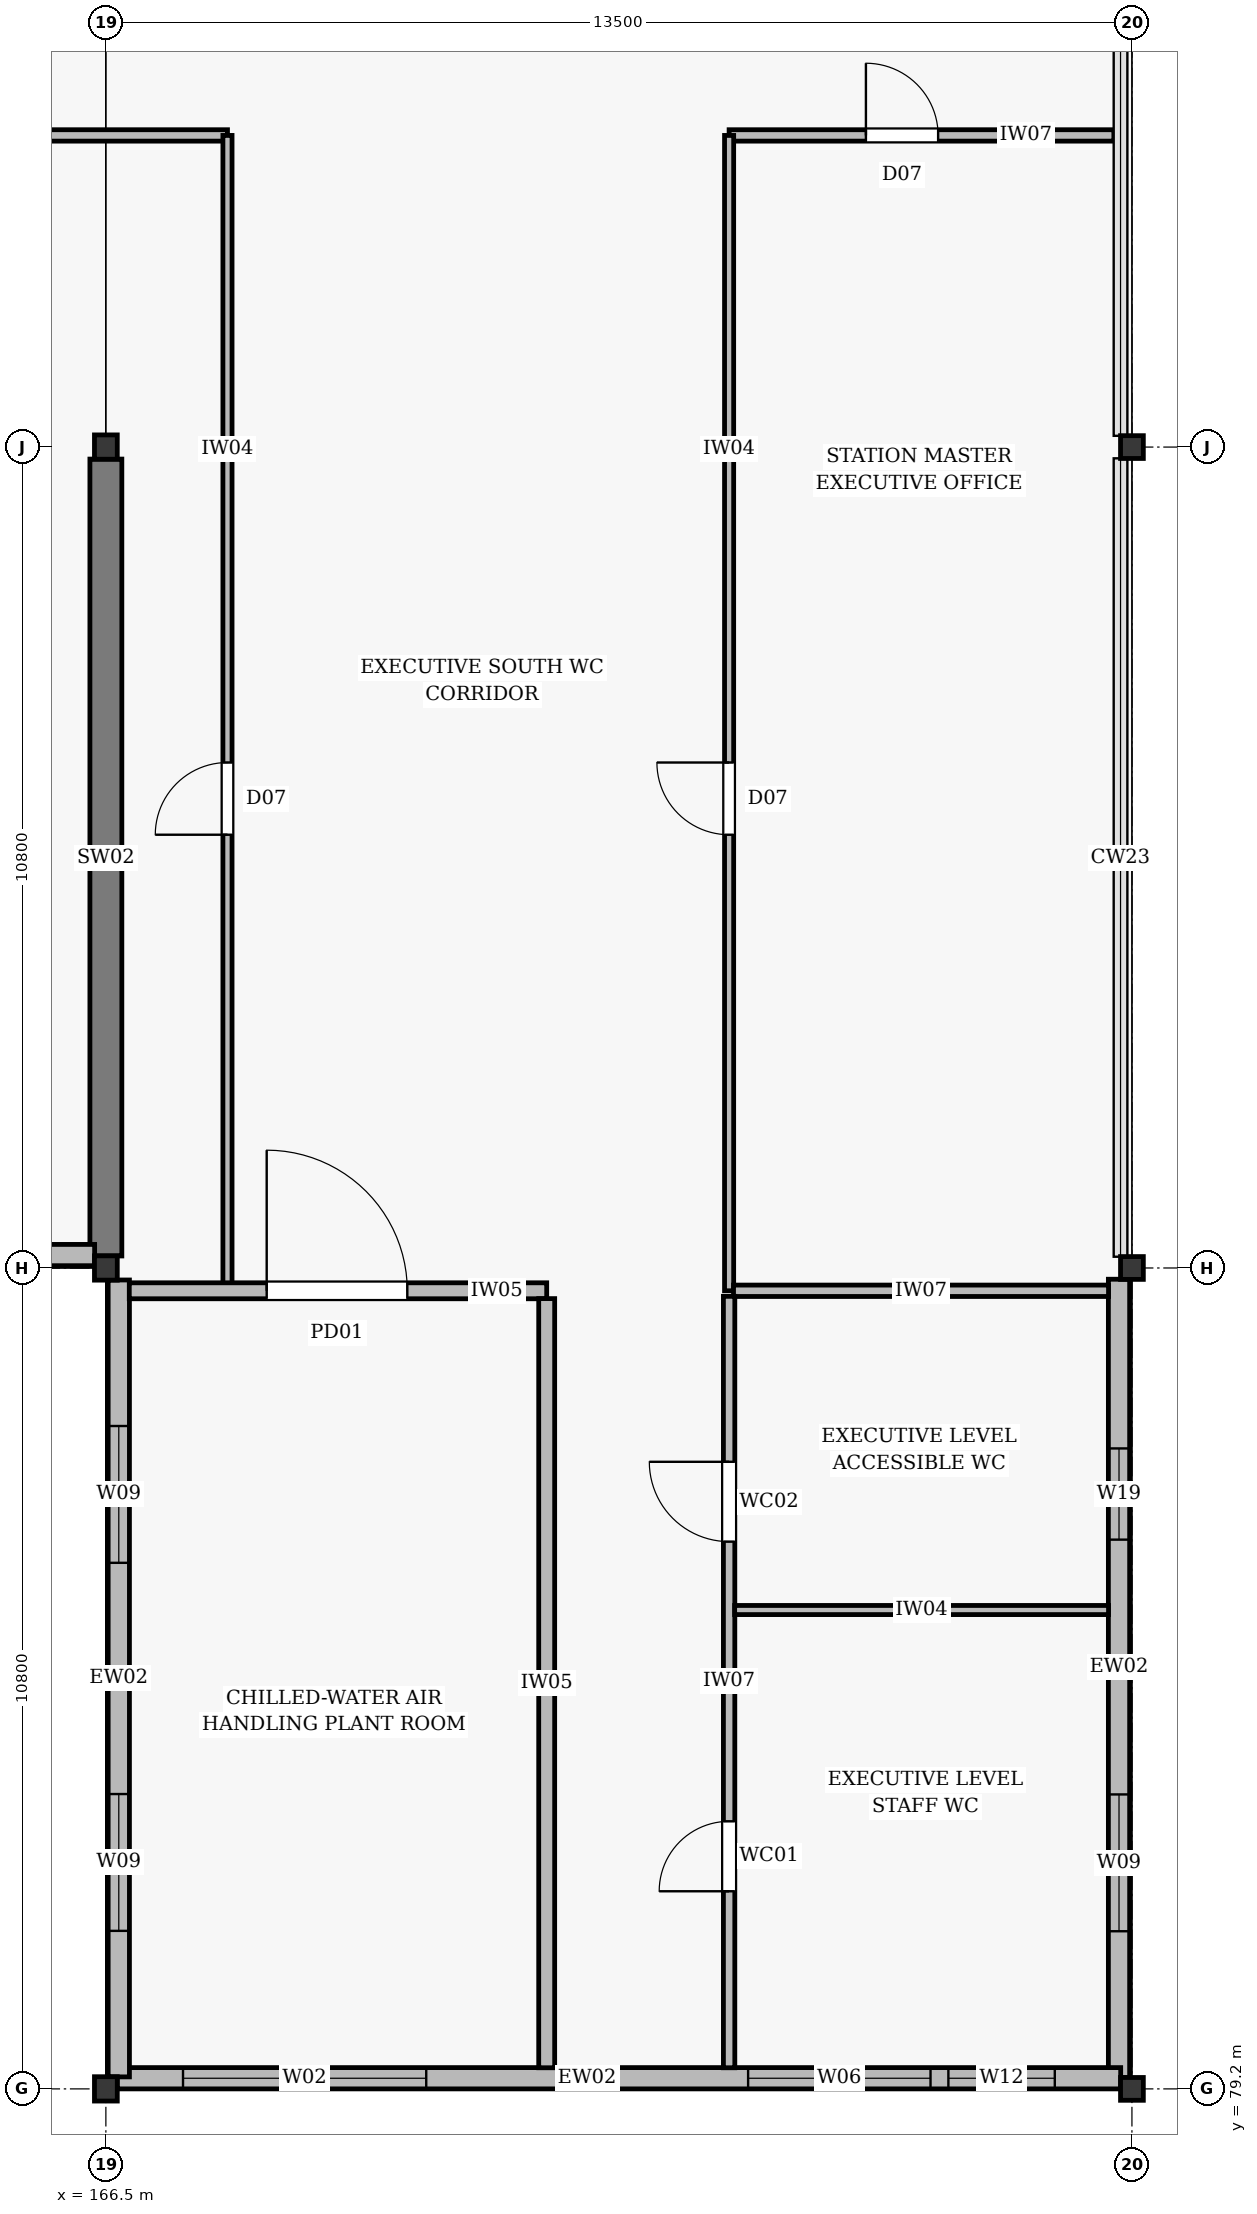
"""IFC4 building model, lengths in metres.
Left out: names, types, materials, properties, quantities, classifications, styles, units other than length and angle.
Written with IfcOpenShell. Run it as: python <this file> out.ifc"""

import sys

from ifc_helpers import new_model, si_unit, direction, frame, frame_2d, origin, origin_2d, place, context, subcontext, project, spatial, rectangle, i_section, extrude, element, fill, save


model = new_model("IFC4")
c1 = context("Model", 3, precision=1e-05, world=origin(), true_north=direction((0.0, 1.0)))
c2 = subcontext(c1, "Body", "Model", "MODEL_VIEW")
j1 = project(units=[si_unit("LENGTHUNIT", "METRE"), si_unit("PLANEANGLEUNIT", "RADIAN")], contexts=[c1])
p1 = place(None, origin())
s1 = spatial("IfcSite", under=j1, at=p1, CompositionType="ELEMENT")
p2 = place(p1, origin())
s2 = spatial("IfcBuilding", under=s1, at=p2, CompositionType="ELEMENT")
p3 = place(p2, frame((0.0, 0.0, 25.2)))
s3 = spatial("IfcBuildingStorey", under=s2, at=p3, CompositionType="ELEMENT", Elevation=25.2)
for number, where, z_axis, x_axis in (
    (1, (166.5, 79.2, 0.0), (0.0, 0.0, 1.0), (1.0, 0.0, 0.0)),
    (2, (166.5, 90.0, 0.0), (0.0, 0.0, 1.0), (1.0, 0.0, 0.0)),
    (3, (166.5, 100.8, 0.0), (0.0, 0.0, 1.0), (1.0, 0.0, 0.0)),
):
    element("IfcColumn", number, at=place(p3, frame(where, z_axis=z_axis, x_axis=x_axis)), inside=s3, PredefinedType="COLUMN", context=c2, shape_type="SweptSolid", body=[
        extrude(i_section(OverallWidth=0.3, OverallDepth=0.32, WebThickness=0.011, FlangeThickness=0.021, at=origin_2d()), origin(), (0.0, 0.0, 1.0), 5.4),
    ])
for number, where, z_axis, x_axis in (
    (4, (180.0, 79.2, 0.0), (0.0, 0.0, 1.0), (1.0, 0.0, 0.0)),
    (5, (180.0, 90.0, 0.0), (0.0, 0.0, 1.0), (1.0, 0.0, 0.0)),
    (6, (180.0, 100.8, 0.0), (0.0, 0.0, 1.0), (1.0, 0.0, 0.0)),
):
    element("IfcColumn", number, at=place(p3, frame(where, z_axis=z_axis, x_axis=x_axis)), inside=s3, PredefinedType="COLUMN", context=c2, shape_type="SweptSolid", body=[
        extrude(i_section(OverallWidth=0.3, OverallDepth=0.3, WebThickness=0.011, FlangeThickness=0.019, at=origin_2d()), origin(), (0.0, 0.0, 1.0), 5.4),
    ])
p4 = place(p3, frame((166.5, 90.158, 0.0), z_axis=(0.0, 0.0, 1.0), x_axis=(0.0, 1.0, 0.0)))
e7 = element("IfcWall", 7, at=p4, inside=s3, PredefinedType="SHEAR", context=c2, shape_type="SweptSolid", body=[
    extrude(rectangle(XDim=10.484, YDim=0.42, at=frame_2d((5.242, 0.0))), origin(), (0.0, 0.0, 1.0), 5.24),
])
p5 = place(p3, frame((179.83, 79.348, 0.0), z_axis=(0.0, 0.0, 1.0), x_axis=(0.0, 1.0, 0.0)))
e8 = element("IfcWall", 8, at=p5, inside=s3, PredefinedType="STANDARD", context=c2, shape_type="SweptSolid", body=[
    extrude(rectangle(XDim=10.504, YDim=0.28, at=frame_2d((5.252, 0.0))), origin(), (0.0, 0.0, 1.0), 4.65),
])
p6 = place(p5, frame((1.926, 0.0, 0.75)))
e9 = element("IfcOpeningElement", 9, at=p6, cuts=e8, PredefinedType="OPENING", context=c2, shape_type="SweptSolid", body=[
    extrude(rectangle(XDim=1.8, YDim=2.2, at=frame_2d((0.9, 1.1))), frame((0.0, 0.152, 0.0), z_axis=(0.0, -1.0, 0.0), x_axis=(1.0, 0.0, 0.0)), (0.0, 0.0, 1.0), 0.304),
])
p7 = place(p5, frame((7.078, 0.0, 1.05)))
e10 = element("IfcOpeningElement", 10, at=p7, cuts=e8, PredefinedType="OPENING", context=c2, shape_type="SweptSolid", body=[
    extrude(rectangle(XDim=1.2, YDim=0.9, at=frame_2d((0.6, 0.45))), frame((0.0, 0.152, 0.0), z_axis=(0.0, -1.0, 0.0), x_axis=(1.0, 0.0, 0.0)), (0.0, 0.0, 1.0), 0.304),
])
p8 = place(p3, frame((166.648, 79.34, 0.0), z_axis=(0.0, 0.0, 1.0), x_axis=(1.0, 0.0, 0.0)))
e11 = element("IfcWall", 11, at=p8, inside=s3, PredefinedType="STANDARD", context=c2, shape_type="SweptSolid", body=[
    extrude(rectangle(XDim=13.204, YDim=0.28, at=frame_2d((6.602, 0.0))), origin(), (0.0, 0.0, 1.0), 4.65),
])
p9 = place(p8, frame((0.867, 0.0, 0.75)))
e12 = element("IfcOpeningElement", 12, at=p9, cuts=e11, PredefinedType="OPENING", context=c2, shape_type="SweptSolid", body=[
    extrude(rectangle(XDim=3.2, YDim=2.8, at=frame_2d((1.6, 1.4))), frame((0.0, 0.152, 0.0), z_axis=(0.0, -1.0, 0.0), x_axis=(1.0, 0.0, 0.0)), (0.0, 0.0, 1.0), 0.304),
])
p10 = place(p8, frame((8.302, 0.0, 0.75)))
e13 = element("IfcOpeningElement", 13, at=p10, cuts=e11, PredefinedType="OPENING", context=c2, shape_type="SweptSolid", body=[
    extrude(rectangle(XDim=2.4, YDim=2.4, at=frame_2d((1.2, 1.2))), frame((0.0, 0.152, 0.0), z_axis=(0.0, -1.0, 0.0), x_axis=(1.0, 0.0, 0.0)), (0.0, 0.0, 1.0), 0.304),
])
p11 = place(p8, frame((10.937, 0.0, 1.05)))
e14 = element("IfcOpeningElement", 14, at=p11, cuts=e11, PredefinedType="OPENING", context=c2, shape_type="SweptSolid", body=[
    extrude(rectangle(XDim=1.4, YDim=1.8, at=frame_2d((0.7, 0.9))), frame((0.0, 0.152, 0.0), z_axis=(0.0, -1.0, 0.0), x_axis=(1.0, 0.0, 0.0)), (0.0, 0.0, 1.0), 0.304),
])
p12 = place(p3, frame((153.148, 90.17, 0.0), z_axis=(0.0, 0.0, 1.0), x_axis=(1.0, 0.0, 0.0)))
e15 = element("IfcWall", 15, at=p12, inside=s3, PredefinedType="STANDARD", context=c2, shape_type="SweptSolid", body=[
    extrude(rectangle(XDim=13.204, YDim=0.28, at=frame_2d((6.602, 0.0))), origin(), (0.0, 0.0, 1.0), 4.65),
])
p13 = place(p12, frame((0.417, 0.0, 0.75)))
e16 = element("IfcOpeningElement", 16, at=p13, cuts=e15, PredefinedType="OPENING", context=c2, shape_type="SweptSolid", body=[
    extrude(rectangle(XDim=2.4, YDim=2.4, at=frame_2d((1.2, 1.2))), frame((0.0, 0.152, 0.0), z_axis=(0.0, -1.0, 0.0), x_axis=(1.0, 0.0, 0.0)), (0.0, 0.0, 1.0), 0.304),
])
p14 = place(p12, frame((5.102, 0.0, 1.05)))
e17 = element("IfcOpeningElement", 17, at=p14, cuts=e15, PredefinedType="OPENING", context=c2, shape_type="SweptSolid", body=[
    extrude(rectangle(XDim=3.0, YDim=1.2, at=frame_2d((1.5, 0.6))), frame((0.0, 0.152, 0.0), z_axis=(0.0, -1.0, 0.0), x_axis=(1.0, 0.0, 0.0)), (0.0, 0.0, 1.0), 0.304),
])
p15 = place(p12, frame((9.537, 0.0, 0.75)))
e18 = element("IfcOpeningElement", 18, at=p15, cuts=e15, PredefinedType="OPENING", context=c2, shape_type="SweptSolid", body=[
    extrude(rectangle(XDim=2.4, YDim=2.4, at=frame_2d((1.2, 1.2))), frame((0.0, 0.152, 0.0), z_axis=(0.0, -1.0, 0.0), x_axis=(1.0, 0.0, 0.0)), (0.0, 0.0, 1.0), 0.304),
])
p16 = place(p3, frame((166.67, 79.358, 0.0), z_axis=(0.0, 0.0, 1.0), x_axis=(0.0, 1.0, 0.0)))
e19 = element("IfcWall", 19, at=p16, inside=s3, PredefinedType="STANDARD", context=c2, shape_type="SweptSolid", body=[
    extrude(rectangle(XDim=10.484, YDim=0.28, at=frame_2d((5.242, 0.0))), origin(), (0.0, 0.0, 1.0), 4.65),
])
p17 = place(p16, frame((1.921, 0.0, 0.75)))
e20 = element("IfcOpeningElement", 20, at=p17, cuts=e19, PredefinedType="OPENING", context=c2, shape_type="SweptSolid", body=[
    extrude(rectangle(XDim=1.8, YDim=2.2, at=frame_2d((0.9, 1.1))), frame((0.0, 0.152, 0.0), z_axis=(0.0, -1.0, 0.0), x_axis=(1.0, 0.0, 0.0)), (0.0, 0.0, 1.0), 0.304),
])
p18 = place(p16, frame((6.763, 0.0, 0.75)))
e21 = element("IfcOpeningElement", 21, at=p18, cuts=e19, PredefinedType="OPENING", context=c2, shape_type="SweptSolid", body=[
    extrude(rectangle(XDim=1.8, YDim=2.2, at=frame_2d((0.9, 1.1))), frame((0.0, 0.152, 0.0), z_axis=(0.0, -1.0, 0.0), x_axis=(1.0, 0.0, 0.0)), (0.0, 0.0, 1.0), 0.304),
])
p19 = place(p3, frame((140.288, 104.9, 0.0), z_axis=(0.0, 0.0, 1.0), x_axis=(1.0, 0.0, 0.0)))
e22 = element("IfcWall", 22, at=p19, inside=s3, PredefinedType="PARTITIONING", context=c2, shape_type="SweptSolid", body=[
    extrude(rectangle(XDim=27.812, YDim=0.15, at=frame_2d((13.906, 0.0))), origin(), (0.0, 0.0, 1.0), 4.87),
])
p20 = place(p19, frame((6.312, 0.0, 0.005)))
e23 = element("IfcOpeningElement", 23, at=p20, cuts=e22, PredefinedType="OPENING", context=c2, shape_type="SweptSolid", body=[
    extrude(rectangle(XDim=1.65, YDim=2.2, at=frame_2d((0.825, 1.1))), frame((0.0, 0.087, 0.0), z_axis=(0.0, -1.0, 0.0), x_axis=(1.0, 0.0, 0.0)), (0.0, 0.0, 1.0), 0.174),
])
p21 = place(p19, frame((20.312, 0.0, 0.005)))
e24 = element("IfcOpeningElement", 24, at=p21, cuts=e22, PredefinedType="OPENING", context=c2, shape_type="SweptSolid", body=[
    extrude(rectangle(XDim=1.1, YDim=2.1, at=frame_2d((0.55, 1.05))), frame((0.0, 0.087, 0.0), z_axis=(0.0, -1.0, 0.0), x_axis=(1.0, 0.0, 0.0)), (0.0, 0.0, 1.0), 0.174),
])
p22 = place(p3, frame((174.7, 104.9, 0.0), z_axis=(0.0, 0.0, 1.0), x_axis=(1.0, 0.0, 0.0)))
e25 = element("IfcWall", 25, at=p22, inside=s3, PredefinedType="PARTITIONING", context=c2, shape_type="SweptSolid", body=[
    extrude(rectangle(XDim=5.062, YDim=0.15, at=frame_2d((2.531, 0.0))), origin(), (0.0, 0.0, 1.0), 4.87),
])
p23 = place(p22, frame((1.8, 0.0, 0.005)))
e26 = element("IfcOpeningElement", 26, at=p23, cuts=e25, PredefinedType="OPENING", context=c2, shape_type="SweptSolid", body=[
    extrude(rectangle(XDim=0.95, YDim=2.1, at=frame_2d((0.475, 1.05))), frame((0.0, 0.087, 0.0), z_axis=(0.0, -1.0, 0.0), x_axis=(1.0, 0.0, 0.0)), (0.0, 0.0, 1.0), 0.174),
])
p24 = place(p3, frame((168.1, 89.7, 0.0), z_axis=(0.0, 0.0, 1.0), x_axis=(0.0, 1.0, 0.0)))
e27 = element("IfcWall", 27, at=p24, inside=s3, PredefinedType="PARTITIONING", context=c2, shape_type="SweptSolid", body=[
    extrude(rectangle(XDim=15.2, YDim=0.12, at=frame_2d((7.6, 0.0))), origin(), (0.0, 0.0, 1.0), 4.68),
])
p25 = place(p24, frame((6.0, 0.0, 0.005)))
e28 = element("IfcOpeningElement", 28, at=p25, cuts=e27, PredefinedType="OPENING", context=c2, shape_type="SweptSolid", body=[
    extrude(rectangle(XDim=0.95, YDim=2.1, at=frame_2d((0.475, 1.05))), frame((0.0, 0.072, 0.0), z_axis=(0.0, -1.0, 0.0), x_axis=(1.0, 0.0, 0.0)), (0.0, 0.0, 1.0), 0.144),
])
p26 = place(p3, frame((174.7, 89.7, 0.0), z_axis=(0.0, 0.0, 1.0), x_axis=(0.0, 1.0, 0.0)))
e29 = element("IfcWall", 29, at=p26, inside=s3, PredefinedType="PARTITIONING", context=c2, shape_type="SweptSolid", body=[
    extrude(rectangle(XDim=15.2, YDim=0.12, at=frame_2d((7.6, 0.0))), origin(), (0.0, 0.0, 1.0), 4.68),
])
p27 = place(p26, frame((6.0, 0.0, 0.005)))
e30 = element("IfcOpeningElement", 30, at=p27, cuts=e29, PredefinedType="OPENING", context=c2, shape_type="SweptSolid", body=[
    extrude(rectangle(XDim=0.95, YDim=2.1, at=frame_2d((0.475, 1.05))), frame((0.0, 0.072, 0.0), z_axis=(0.0, -1.0, 0.0), x_axis=(1.0, 0.0, 0.0)), (0.0, 0.0, 1.0), 0.144),
])
p28 = place(p3, frame((166.808, 89.7, 0.0), z_axis=(0.0, 0.0, 1.0), x_axis=(1.0, 0.0, 0.0)))
e31 = element("IfcWall", 31, at=p28, inside=s3, PredefinedType="PARTITIONING", context=c2, shape_type="SweptSolid", body=[
    extrude(rectangle(XDim=5.492, YDim=0.21, at=frame_2d((2.746, 0.0))), origin(), (0.0, 0.0, 1.0), 4.68),
])
p29 = place(p28, frame((1.808, 0.0, 0.005)))
e32 = element("IfcOpeningElement", 32, at=p29, cuts=e31, PredefinedType="OPENING", context=c2, shape_type="SweptSolid", body=[
    extrude(rectangle(XDim=1.85, YDim=2.35, at=frame_2d((0.925, 1.175))), frame((0.0, 0.117, 0.0), z_axis=(0.0, -1.0, 0.0), x_axis=(1.0, 0.0, 0.0)), (0.0, 0.0, 1.0), 0.234),
])
p30 = place(p3, frame((172.3, 79.478, 0.0), z_axis=(0.0, 0.0, 1.0), x_axis=(0.0, 1.0, 0.0)))
e33 = element("IfcWall", 33, at=p30, inside=s3, PredefinedType="PARTITIONING", context=c2, shape_type="SweptSolid", body=[
    extrude(rectangle(XDim=10.119, YDim=0.21, at=frame_2d((5.06, 0.0))), origin(), (0.0, 0.0, 1.0), 4.68),
])
p31 = place(p3, frame((174.758, 89.7, 0.0), z_axis=(0.0, 0.0, 1.0), x_axis=(1.0, 0.0, 0.0)))
e34 = element("IfcWall", 34, at=p31, inside=s3, PredefinedType="PARTITIONING", context=c2, shape_type="SweptSolid", body=[
    extrude(rectangle(XDim=4.934, YDim=0.15, at=frame_2d((2.467, 0.0))), origin(), (0.0, 0.0, 1.0), 4.68),
])
p32 = place(p3, frame((174.7, 79.478, 0.0), z_axis=(0.0, 0.0, 1.0), x_axis=(0.0, 1.0, 0.0)))
e35 = element("IfcWall", 35, at=p32, inside=s3, PredefinedType="PARTITIONING", context=c2, shape_type="SweptSolid", body=[
    extrude(rectangle(XDim=10.149, YDim=0.15, at=frame_2d((5.074, 0.0))), origin(), (0.0, 0.0, 1.0), 4.68),
])
p33 = place(p32, frame((2.322, 0.0, 0.005)))
e36 = element("IfcOpeningElement", 36, at=p33, cuts=e35, PredefinedType="OPENING", context=c2, shape_type="SweptSolid", body=[
    extrude(rectangle(XDim=0.92, YDim=2.12, at=frame_2d((0.46, 1.06))), frame((0.0, 0.087, 0.0), z_axis=(0.0, -1.0, 0.0), x_axis=(1.0, 0.0, 0.0)), (0.0, 0.0, 1.0), 0.174),
])
p34 = place(p32, frame((6.922, 0.0, 0.005)))
e37 = element("IfcOpeningElement", 37, at=p34, cuts=e35, PredefinedType="OPENING", context=c2, shape_type="SweptSolid", body=[
    extrude(rectangle(XDim=1.05, YDim=2.15, at=frame_2d((0.525, 1.075))), frame((0.0, 0.087, 0.0), z_axis=(0.0, -1.0, 0.0), x_axis=(1.0, 0.0, 0.0)), (0.0, 0.0, 1.0), 0.174),
])
p35 = place(p3, frame((174.773, 85.5, 0.0), z_axis=(0.0, 0.0, 1.0), x_axis=(1.0, 0.0, 0.0)))
e38 = element("IfcWall", 38, at=p35, inside=s3, PredefinedType="PARTITIONING", context=c2, shape_type="SweptSolid", body=[
    extrude(rectangle(XDim=4.919, YDim=0.12, at=frame_2d((2.459, 0.0))), origin(), (0.0, 0.0, 1.0), 4.87),
])
p36 = place(p6, origin())
e39 = element("IfcWindow", 39, at=p36, inside=s3, PartitioningType="DOUBLE_PANEL_VERTICAL", PredefinedType="WINDOW", context=c2, shape_type="SweptSolid", body=[
    extrude(rectangle(XDim=1.8, YDim=2.2, at=frame_2d((0.9, 1.1))), frame((0.0, 0.03, 0.0), z_axis=(0.0, -1.0, 0.0), x_axis=(1.0, 0.0, 0.0)), (0.0, 0.0, 1.0), 0.06),
])
fill(e9, e39)
p37 = place(p7, origin())
e40 = element("IfcWindow", 40, at=p37, inside=s3, PartitioningType="DOUBLE_PANEL_VERTICAL", PredefinedType="WINDOW", context=c2, shape_type="SweptSolid", body=[
    extrude(rectangle(XDim=1.2, YDim=0.9, at=frame_2d((0.6, 0.45))), frame((0.0, 0.03, 0.0), z_axis=(0.0, -1.0, 0.0), x_axis=(1.0, 0.0, 0.0)), (0.0, 0.0, 1.0), 0.06),
])
fill(e10, e40)
p38 = place(p9, origin())
e41 = element("IfcWindow", 41, at=p38, inside=s3, PartitioningType="DOUBLE_PANEL_VERTICAL", PredefinedType="WINDOW", context=c2, shape_type="SweptSolid", body=[
    extrude(rectangle(XDim=3.2, YDim=2.8, at=frame_2d((1.6, 1.4))), frame((0.0, 0.03, 0.0), z_axis=(0.0, -1.0, 0.0), x_axis=(1.0, 0.0, 0.0)), (0.0, 0.0, 1.0), 0.06),
])
fill(e12, e41)
p39 = place(p10, origin())
e42 = element("IfcWindow", 42, at=p39, inside=s3, PartitioningType="DOUBLE_PANEL_VERTICAL", PredefinedType="WINDOW", context=c2, shape_type="SweptSolid", body=[
    extrude(rectangle(XDim=2.4, YDim=2.4, at=frame_2d((1.2, 1.2))), frame((0.0, 0.03, 0.0), z_axis=(0.0, -1.0, 0.0), x_axis=(1.0, 0.0, 0.0)), (0.0, 0.0, 1.0), 0.06),
])
fill(e13, e42)
p40 = place(p11, origin())
e43 = element("IfcWindow", 43, at=p40, inside=s3, PartitioningType="DOUBLE_PANEL_VERTICAL", PredefinedType="WINDOW", context=c2, shape_type="SweptSolid", body=[
    extrude(rectangle(XDim=1.4, YDim=1.8, at=frame_2d((0.7, 0.9))), frame((0.0, 0.03, 0.0), z_axis=(0.0, -1.0, 0.0), x_axis=(1.0, 0.0, 0.0)), (0.0, 0.0, 1.0), 0.06),
])
fill(e14, e43)
p41 = place(p17, origin())
e44 = element("IfcWindow", 44, at=p41, inside=s3, PartitioningType="DOUBLE_PANEL_VERTICAL", PredefinedType="WINDOW", context=c2, shape_type="SweptSolid", body=[
    extrude(rectangle(XDim=1.8, YDim=2.2, at=frame_2d((0.9, 1.1))), frame((0.0, 0.03, 0.0), z_axis=(0.0, -1.0, 0.0), x_axis=(1.0, 0.0, 0.0)), (0.0, 0.0, 1.0), 0.06),
])
fill(e20, e44)
p42 = place(p18, origin())
e45 = element("IfcWindow", 45, at=p42, inside=s3, PartitioningType="DOUBLE_PANEL_VERTICAL", PredefinedType="WINDOW", context=c2, shape_type="SweptSolid", body=[
    extrude(rectangle(XDim=1.8, YDim=2.2, at=frame_2d((0.9, 1.1))), frame((0.0, 0.03, 0.0), z_axis=(0.0, -1.0, 0.0), x_axis=(1.0, 0.0, 0.0)), (0.0, 0.0, 1.0), 0.06),
])
fill(e21, e45)
p43 = place(p23, origin())
e46 = element("IfcDoor", 46, at=p43, inside=s3, OperationType="SINGLE_SWING_LEFT", PredefinedType="DOOR", context=c2, shape_type="SweptSolid", body=[
    extrude(rectangle(XDim=0.95, YDim=2.1, at=frame_2d((0.475, 1.05))), frame((0.0, 0.025, 0.0), z_axis=(0.0, -1.0, 0.0), x_axis=(1.0, 0.0, 0.0)), (0.0, 0.0, 1.0), 0.05),
])
fill(e26, e46)
p44 = place(p25, origin())
e47 = element("IfcDoor", 47, at=p44, inside=s3, OperationType="SINGLE_SWING_LEFT", PredefinedType="DOOR", context=c2, shape_type="SweptSolid", body=[
    extrude(rectangle(XDim=0.95, YDim=2.1, at=frame_2d((0.475, 1.05))), frame((0.0, 0.025, 0.0), z_axis=(0.0, -1.0, 0.0), x_axis=(1.0, 0.0, 0.0)), (0.0, 0.0, 1.0), 0.05),
])
fill(e28, e47)
p45 = place(p27, origin())
e48 = element("IfcDoor", 48, at=p45, inside=s3, OperationType="SINGLE_SWING_RIGHT", PredefinedType="DOOR", context=c2, shape_type="SweptSolid", body=[
    extrude(rectangle(XDim=0.95, YDim=2.1, at=frame_2d((0.475, 1.05))), frame((0.0, 0.025, 0.0), z_axis=(0.0, -1.0, 0.0), x_axis=(1.0, 0.0, 0.0)), (0.0, 0.0, 1.0), 0.05),
])
fill(e30, e48)
p46 = place(p29, origin())
e49 = element("IfcDoor", 49, at=p46, inside=s3, OperationType="DOUBLE_DOOR_SINGLE_SWING", PredefinedType="DOOR", context=c2, shape_type="SweptSolid", body=[
    extrude(rectangle(XDim=1.85, YDim=2.35, at=frame_2d((0.925, 1.175))), frame((0.0, 0.025, 0.0), z_axis=(0.0, -1.0, 0.0), x_axis=(1.0, 0.0, 0.0)), (0.0, 0.0, 1.0), 0.05),
])
fill(e32, e49)
p47 = place(p33, origin())
e50 = element("IfcDoor", 50, at=p47, inside=s3, OperationType="SINGLE_SWING_LEFT", PredefinedType="DOOR", context=c2, shape_type="SweptSolid", body=[
    extrude(rectangle(XDim=0.92, YDim=2.12, at=frame_2d((0.46, 1.06))), frame((0.0, 0.025, 0.0), z_axis=(0.0, -1.0, 0.0), x_axis=(1.0, 0.0, 0.0)), (0.0, 0.0, 1.0), 0.05),
])
fill(e36, e50)
p48 = place(p34, origin())
e51 = element("IfcDoor", 51, at=p48, inside=s3, OperationType="SINGLE_SWING_RIGHT", PredefinedType="DOOR", context=c2, shape_type="SweptSolid", body=[
    extrude(rectangle(XDim=1.05, YDim=2.15, at=frame_2d((0.525, 1.075))), frame((0.0, 0.025, 0.0), z_axis=(0.0, -1.0, 0.0), x_axis=(1.0, 0.0, 0.0)), (0.0, 0.0, 1.0), 0.05),
])
fill(e37, e51)
save(model, sys.argv[1])
